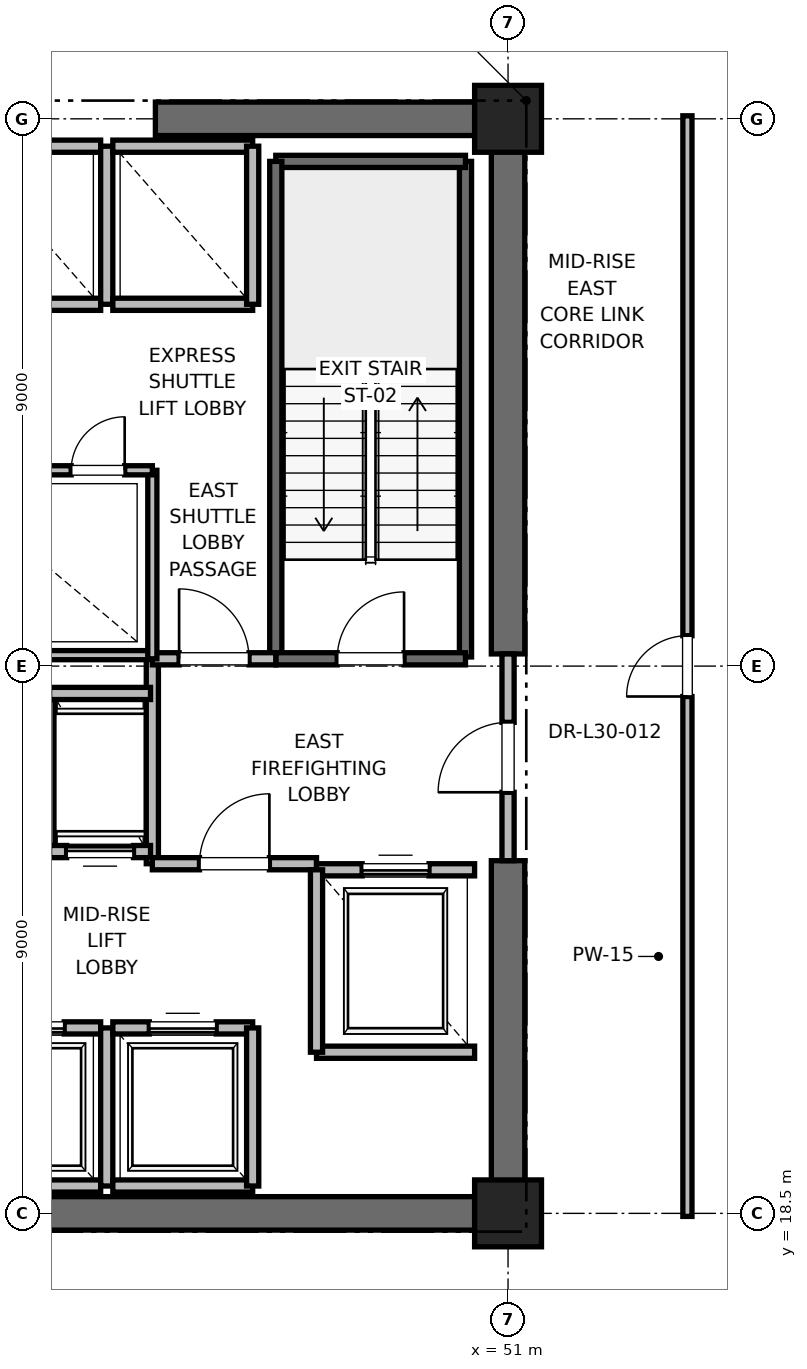
"""IFC4 building model, lengths in metres.
Left out: names, types, materials, properties, quantities, classifications, styles, units other than length and angle.
Written with IfcOpenShell. Run it as: python <this file> out.ifc"""

import sys

from ifc_helpers import new_model, si_unit, direction, frame, frame_2d, origin, origin_2d, place, context, subcontext, project, spatial, rectangle, extrude, element, fill, save


model = new_model("IFC4")
c1 = context("Model", 3, precision=1e-05, world=origin(), true_north=direction((0.0, 1.0)))
c2 = subcontext(c1, "Body", "Model", "MODEL_VIEW")
j1 = project(units=[si_unit("LENGTHUNIT", "METRE"), si_unit("PLANEANGLEUNIT", "RADIAN")], contexts=[c1])
p1 = place(None, origin())
s1 = spatial("IfcSite", under=j1, at=p1, CompositionType="ELEMENT")
p2 = place(p1, origin())
s2 = spatial("IfcBuilding", under=s1, at=p2, CompositionType="ELEMENT")
p3 = place(p2, frame((0.0, 0.0, 132.4)))
s3 = spatial("IfcBuildingStorey", under=s2, at=p3, CompositionType="ELEMENT", Elevation=132.4)
for number, where, z_axis, x_axis in (
    (1, (51.0, 18.5, 0.0), (0.0, 0.0, 1.0), (1.0, 0.0, 0.0)),
    (2, (51.0, 36.5, 0.0), (0.0, 0.0, 1.0), (1.0, 0.0, 0.0)),
):
    element("IfcColumn", number, at=place(p3, frame(where, z_axis=z_axis, x_axis=x_axis)), inside=s3, PredefinedType="PILASTER", context=c2, shape_type="SweptSolid", body=[
        extrude(rectangle(XDim=1.1, YDim=1.1, at=origin_2d()), origin(), (0.0, 0.0, 1.0), 4.0),
    ])
p4 = place(p3, frame((41.8, 18.5, 0.0), z_axis=(0.0, 0.0, 1.0), x_axis=(1.0, 0.0, 0.0)))
e3 = element("IfcWall", 3, at=p4, inside=s3, PredefinedType="SHEAR", context=c2, shape_type="SweptSolid", body=[
    extrude(rectangle(XDim=9.2, YDim=0.55, at=frame_2d((4.6, 0.0))), origin(), (0.0, 0.0, 1.0), 3.775),
])
for number, where, z_axis, x_axis in (
    (4, (45.2, 36.5, 0.0), (0.0, 0.0, 1.0), (1.0, 0.0, 0.0)),
    (5, (51.0, 18.5, 0.0), (0.0, 0.0, 1.0), (0.0, 1.0, 0.0)),
):
    element("IfcWall", number, at=place(p3, frame(where, z_axis=z_axis, x_axis=x_axis)), inside=s3, PredefinedType="SHEAR", context=c2, shape_type="SweptSolid", body=[
        extrude(rectangle(XDim=5.8, YDim=0.55, at=frame_2d((2.9, 0.0))), origin(), (0.0, 0.0, 1.0), 3.775),
    ])
p5 = place(p3, frame((51.0, 27.7, 0.0), z_axis=(0.0, 0.0, 1.0), x_axis=(0.0, 1.0, 0.0)))
e6 = element("IfcWall", 6, at=p5, inside=s3, PredefinedType="SHEAR", context=c2, shape_type="SweptSolid", body=[
    extrude(rectangle(XDim=8.8, YDim=0.55, at=frame_2d((4.4, 0.0))), origin(), (0.0, 0.0, 1.0), 3.775),
])
p6 = place(p3, frame((50.3, 27.65, 0.0), z_axis=(0.0, 0.0, 1.0), x_axis=(0.0, 1.0, 0.0)))
e7 = element("IfcWall", 7, at=p6, inside=s3, PredefinedType="SOLIDWALL", context=c2, shape_type="SweptSolid", body=[
    extrude(rectangle(XDim=8.15, YDim=0.2, at=frame_2d((4.075, 0.0))), origin(), (0.0, 0.0, 1.0), 3.775),
])
p7 = place(p3, frame((47.18, 35.8, 0.0), z_axis=(0.0, 0.0, 1.0), x_axis=(1.0, 0.0, 0.0)))
e8 = element("IfcWall", 8, at=p7, inside=s3, PredefinedType="SOLIDWALL", context=c2, shape_type="SweptSolid", body=[
    extrude(rectangle(XDim=3.12, YDim=0.2, at=frame_2d((1.56, 0.0))), origin(), (0.0, 0.0, 1.0), 3.775),
])
p8 = place(p3, frame((47.18, 27.62, 0.0), z_axis=(0.0, 0.0, 1.0), x_axis=(0.0, 1.0, 0.0)))
e9 = element("IfcWall", 9, at=p8, inside=s3, PredefinedType="SOLIDWALL", context=c2, shape_type="SweptSolid", body=[
    extrude(rectangle(XDim=8.18, YDim=0.2, at=frame_2d((4.09, 0.0))), origin(), (0.0, 0.0, 1.0), 3.775),
])
p9 = place(p3, frame((47.18, 27.62, 0.0), z_axis=(0.0, 0.0, 1.0), x_axis=(1.0, 0.0, 0.0)))
e10 = element("IfcWall", 10, at=p9, inside=s3, PredefinedType="SOLIDWALL", context=c2, shape_type="SweptSolid", body=[
    extrude(rectangle(XDim=3.12, YDim=0.2, at=frame_2d((1.56, 0.0))), origin(), (0.0, 0.0, 1.0), 3.775),
])
p10 = place(p9, frame((1.01, 0.0, 0.0)))
e11 = element("IfcOpeningElement", 11, at=p10, cuts=e10, PredefinedType="OPENING", context=c2, shape_type="SweptSolid", body=[
    extrude(rectangle(XDim=1.1, YDim=2.15, at=frame_2d((0.55, 1.075))), frame((0.0, 0.1, 0.0), z_axis=(0.0, -1.0, 0.0), x_axis=(1.0, 0.0, 0.0)), (0.0, 0.0, 1.0), 0.2),
])
p11 = place(p3, frame((45.15, 24.25, 0.0), z_axis=(0.0, 0.0, 1.0), x_axis=(0.0, 1.0, 0.0)))
e12 = element("IfcWall", 12, at=p11, inside=s3, PredefinedType="PARTITIONING", context=c2, shape_type="SweptSolid", body=[
    extrude(rectangle(XDim=3.37, YDim=0.2, at=frame_2d((1.685, 0.0))), origin(), (0.0, 0.0, 1.0), 3.775),
])
p12 = place(p3, frame((45.15, 24.25, 0.0), z_axis=(0.0, 0.0, 1.0), x_axis=(1.0, 0.0, 0.0)))
e13 = element("IfcWall", 13, at=p12, inside=s3, PredefinedType="PARTITIONING", context=c2, shape_type="SweptSolid", body=[
    extrude(rectangle(XDim=2.7, YDim=0.2, at=frame_2d((1.35, 0.0))), origin(), (0.0, 0.0, 1.0), 3.775),
])
p13 = place(p12, frame((0.775, 0.0, 0.0)))
e14 = element("IfcOpeningElement", 14, at=p13, cuts=e13, PredefinedType="OPENING", context=c2, shape_type="SweptSolid", body=[
    extrude(rectangle(XDim=1.15, YDim=2.2, at=frame_2d((0.575, 1.1))), frame((0.0, 0.1, 0.0), z_axis=(0.0, -1.0, 0.0), x_axis=(1.0, 0.0, 0.0)), (0.0, 0.0, 1.0), 0.2),
])
p14 = place(p3, frame((45.15, 27.62, 0.0), z_axis=(0.0, 0.0, 1.0), x_axis=(1.0, 0.0, 0.0)))
e15 = element("IfcWall", 15, at=p14, inside=s3, PredefinedType="PARTITIONING", context=c2, shape_type="SweptSolid", body=[
    extrude(rectangle(XDim=2.03, YDim=0.2, at=frame_2d((1.015, 0.0))), origin(), (0.0, 0.0, 1.0), 3.775),
])
p15 = place(p14, frame((0.44, 0.0, 0.0)))
e16 = element("IfcOpeningElement", 16, at=p15, cuts=e15, PredefinedType="OPENING", context=c2, shape_type="SweptSolid", body=[
    extrude(rectangle(XDim=1.15, YDim=2.2, at=frame_2d((0.575, 1.1))), frame((0.0, 0.1, 0.0), z_axis=(0.0, -1.0, 0.0), x_axis=(1.0, 0.0, 0.0)), (0.0, 0.0, 1.0), 0.2),
])
p16 = place(p3, frame((51.0, 24.3, 0.0), z_axis=(0.0, 0.0, 1.0), x_axis=(0.0, 1.0, 0.0)))
e17 = element("IfcWall", 17, at=p16, inside=s3, PredefinedType="PARTITIONING", context=c2, shape_type="SweptSolid", body=[
    extrude(rectangle(XDim=3.4, YDim=0.2, at=frame_2d((1.7, 0.0))), origin(), (0.0, 0.0, 1.0), 2.755),
])
p17 = place(p16, frame((1.125, 0.0, 0.0)))
e18 = element("IfcOpeningElement", 18, at=p17, cuts=e17, PredefinedType="OPENING", context=c2, shape_type="SweptSolid", body=[
    extrude(rectangle(XDim=1.15, YDim=2.2, at=frame_2d((0.575, 1.1))), frame((0.0, 0.1, 0.0), z_axis=(0.0, -1.0, 0.0), x_axis=(1.0, 0.0, 0.0)), (0.0, 0.0, 1.0), 0.2),
])
p18 = place(p3, frame((47.85, 21.15, 0.0), z_axis=(0.0, 0.0, 1.0), x_axis=(1.0, 0.0, 0.0)))
e19 = element("IfcWall", 19, at=p18, inside=s3, PredefinedType="SOLIDWALL", context=c2, shape_type="SweptSolid", body=[
    extrude(rectangle(XDim=2.6, YDim=0.2, at=frame_2d((1.3, 0.0))), origin(), (0.0, 0.0, 1.0), 3.775),
])
p19 = place(p3, frame((50.45, 24.15, 0.0), z_axis=(0.0, 0.0, 1.0), x_axis=(-1.0, 0.0, 0.0)))
e20 = element("IfcWall", 20, at=p19, inside=s3, PredefinedType="SOLIDWALL", context=c2, shape_type="SweptSolid", body=[
    extrude(rectangle(XDim=2.6, YDim=0.2, at=frame_2d((1.3, 0.0))), origin(), (0.0, 0.0, 1.0), 2.755),
])
p20 = place(p19, frame((0.75, 0.0, 0.0)))
e21 = element("IfcOpeningElement", 21, at=p20, cuts=e20, PredefinedType="OPENING", context=c2, shape_type="SweptSolid", body=[
    extrude(rectangle(XDim=1.1, YDim=2.2, at=frame_2d((0.55, 1.1))), frame((0.0, 0.1, 0.0), z_axis=(0.0, -1.0, 0.0), x_axis=(1.0, 0.0, 0.0)), (0.0, 0.0, 1.0), 0.2),
])
p21 = place(p3, frame((47.85, 24.15, 0.0), z_axis=(0.0, 0.0, 1.0), x_axis=(0.0, -1.0, 0.0)))
e22 = element("IfcWall", 22, at=p21, inside=s3, PredefinedType="SOLIDWALL", context=c2, shape_type="SweptSolid", body=[
    extrude(rectangle(XDim=3.0, YDim=0.2, at=frame_2d((1.5, 0.0))), origin(), (0.0, 0.0, 1.0), 3.775),
])
p22 = place(p3, frame((42.0, 18.95, 0.0), z_axis=(0.0, 0.0, 1.0), x_axis=(1.0, 0.0, 0.0)))
e23 = element("IfcWall", 23, at=p22, inside=s3, PredefinedType="SOLIDWALL", context=c2, shape_type="SweptSolid", body=[
    extrude(rectangle(XDim=2.3, YDim=0.2, at=frame_2d((1.15, 0.0))), origin(), (0.0, 0.0, 1.0), 2.755),
])
p23 = place(p3, frame((44.3, 21.55, 0.0), z_axis=(0.0, 0.0, 1.0), x_axis=(-1.0, 0.0, 0.0)))
e24 = element("IfcWall", 24, at=p23, inside=s3, PredefinedType="SOLIDWALL", context=c2, shape_type="SweptSolid", body=[
    extrude(rectangle(XDim=2.3, YDim=0.2, at=frame_2d((1.15, 0.0))), origin(), (0.0, 0.0, 1.0), 3.775),
])
p24 = place(p23, frame((0.6, 0.0, 0.0)))
e25 = element("IfcOpeningElement", 25, at=p24, cuts=e24, PredefinedType="OPENING", context=c2, shape_type="SweptSolid", body=[
    extrude(rectangle(XDim=1.1, YDim=2.2, at=frame_2d((0.55, 1.1))), frame((0.0, 0.1, 0.0), z_axis=(0.0, -1.0, 0.0), x_axis=(1.0, 0.0, 0.0)), (0.0, 0.0, 1.0), 0.2),
])
p25 = place(p3, frame((44.4, 18.95, 0.0), z_axis=(0.0, 0.0, 1.0), x_axis=(0.0, 1.0, 0.0)))
e26 = element("IfcWall", 26, at=p25, inside=s3, PredefinedType="SOLIDWALL", context=c2, shape_type="SweptSolid", body=[
    extrude(rectangle(XDim=2.6, YDim=0.2, at=frame_2d((1.3, 0.0))), origin(), (0.0, 0.0, 1.0), 3.775),
])
p26 = place(p3, frame((44.5, 18.95, 0.0), z_axis=(0.0, 0.0, 1.0), x_axis=(1.0, 0.0, 0.0)))
e27 = element("IfcWall", 27, at=p26, inside=s3, PredefinedType="SOLIDWALL", context=c2, shape_type="SweptSolid", body=[
    extrude(rectangle(XDim=2.3, YDim=0.2, at=frame_2d((1.15, 0.0))), origin(), (0.0, 0.0, 1.0), 3.775),
])
p27 = place(p3, frame((46.8, 21.55, 0.0), z_axis=(0.0, 0.0, 1.0), x_axis=(-1.0, 0.0, 0.0)))
e28 = element("IfcWall", 28, at=p27, inside=s3, PredefinedType="SOLIDWALL", context=c2, shape_type="SweptSolid", body=[
    extrude(rectangle(XDim=2.3, YDim=0.2, at=frame_2d((1.15, 0.0))), origin(), (0.0, 0.0, 1.0), 3.775),
])
p28 = place(p27, frame((0.6, 0.0, 0.0)))
e29 = element("IfcOpeningElement", 29, at=p28, cuts=e28, PredefinedType="OPENING", context=c2, shape_type="SweptSolid", body=[
    extrude(rectangle(XDim=1.1, YDim=2.2, at=frame_2d((0.55, 1.1))), frame((0.0, 0.1, 0.0), z_axis=(0.0, -1.0, 0.0), x_axis=(1.0, 0.0, 0.0)), (0.0, 0.0, 1.0), 0.2),
])
for number, where, z_axis, x_axis in (
    (30, (46.8, 18.95, 0.0), (0.0, 0.0, 1.0), (0.0, 1.0, 0.0)),
    (31, (43.45, 24.45, 0.0), (0.0, 0.0, 1.0), (0.0, 1.0, 0.0)),
):
    element("IfcWall", number, at=place(p3, frame(where, z_axis=z_axis, x_axis=x_axis)), inside=s3, PredefinedType="SOLIDWALL", context=c2, shape_type="SweptSolid", body=[
        extrude(rectangle(XDim=2.6, YDim=0.2, at=frame_2d((1.3, 0.0))), origin(), (0.0, 0.0, 1.0), 3.775),
    ])
p29 = place(p3, frame((43.46, 24.45, 0.0), z_axis=(0.0, 0.0, 1.0), x_axis=(1.0, 0.0, 0.0)))
e32 = element("IfcWall", 32, at=p29, inside=s3, PredefinedType="SOLIDWALL", context=c2, shape_type="SweptSolid", body=[
    extrude(rectangle(XDim=1.66, YDim=0.2, at=frame_2d((0.83, 0.0))), origin(), (0.0, 0.0, 1.0), 3.775),
])
p30 = place(p29, frame((0.28, 0.0, 0.0)))
e33 = element("IfcOpeningElement", 33, at=p30, cuts=e32, PredefinedType="OPENING", context=c2, shape_type="SweptSolid", body=[
    extrude(rectangle(XDim=1.1, YDim=2.2, at=frame_2d((0.55, 1.1))), frame((0.0, 0.1, 0.0), z_axis=(0.0, -1.0, 0.0), x_axis=(1.0, 0.0, 0.0)), (0.0, 0.0, 1.0), 0.2),
])
p31 = place(p3, frame((45.12, 27.05, 0.0), z_axis=(0.0, 0.0, 1.0), x_axis=(-1.0, 0.0, 0.0)))
e34 = element("IfcWall", 34, at=p31, inside=s3, PredefinedType="SOLIDWALL", context=c2, shape_type="SweptSolid", body=[
    extrude(rectangle(XDim=1.66, YDim=0.2, at=frame_2d((0.83, 0.0))), origin(), (0.0, 0.0, 1.0), 3.775),
])
p32 = place(p3, frame((42.0, 33.45, 0.0), z_axis=(0.0, 0.0, 1.0), x_axis=(1.0, 0.0, 0.0)))
e35 = element("IfcWall", 35, at=p32, inside=s3, PredefinedType="SOLIDWALL", context=c2, shape_type="SweptSolid", body=[
    extrude(rectangle(XDim=2.3, YDim=0.2, at=frame_2d((1.15, 0.0))), origin(), (0.0, 0.0, 1.0), 3.775),
])
p33 = place(p3, frame((44.3, 36.05, 0.0), z_axis=(0.0, 0.0, 1.0), x_axis=(-1.0, 0.0, 0.0)))
e36 = element("IfcWall", 36, at=p33, inside=s3, PredefinedType="SOLIDWALL", context=c2, shape_type="SweptSolid", body=[
    extrude(rectangle(XDim=2.3, YDim=0.2, at=frame_2d((1.15, 0.0))), origin(), (0.0, 0.0, 1.0), 2.755),
])
p34 = place(p3, frame((44.4, 33.45, 0.0), z_axis=(0.0, 0.0, 1.0), x_axis=(0.0, 1.0, 0.0)))
e37 = element("IfcWall", 37, at=p34, inside=s3, PredefinedType="SOLIDWALL", context=c2, shape_type="SweptSolid", body=[
    extrude(rectangle(XDim=2.6, YDim=0.2, at=frame_2d((1.3, 0.0))), origin(), (0.0, 0.0, 1.0), 2.755),
])
p35 = place(p3, frame((44.5, 33.45, 0.0), z_axis=(0.0, 0.0, 1.0), x_axis=(1.0, 0.0, 0.0)))
e38 = element("IfcWall", 38, at=p35, inside=s3, PredefinedType="SOLIDWALL", context=c2, shape_type="SweptSolid", body=[
    extrude(rectangle(XDim=2.3, YDim=0.2, at=frame_2d((1.15, 0.0))), origin(), (0.0, 0.0, 1.0), 3.775),
])
p36 = place(p3, frame((46.8, 36.05, 0.0), z_axis=(0.0, 0.0, 1.0), x_axis=(-1.0, 0.0, 0.0)))
e39 = element("IfcWall", 39, at=p36, inside=s3, PredefinedType="SOLIDWALL", context=c2, shape_type="SweptSolid", body=[
    extrude(rectangle(XDim=2.3, YDim=0.2, at=frame_2d((1.15, 0.0))), origin(), (0.0, 0.0, 1.0), 2.755),
])
p37 = place(p3, frame((46.8, 33.45, 0.0), z_axis=(0.0, 0.0, 1.0), x_axis=(0.0, 1.0, 0.0)))
e40 = element("IfcWall", 40, at=p37, inside=s3, PredefinedType="SOLIDWALL", context=c2, shape_type="SweptSolid", body=[
    extrude(rectangle(XDim=2.6, YDim=0.2, at=frame_2d((1.3, 0.0))), origin(), (0.0, 0.0, 1.0), 3.775),
])
p38 = place(p3, frame((41.56, 27.68, 0.0), z_axis=(0.0, 0.0, 1.0), x_axis=(1.0, 0.0, 0.0)))
e41 = element("IfcWall", 41, at=p38, inside=s3, PredefinedType="PARTITIONING", context=c2, shape_type="SweptSolid", body=[
    extrude(rectangle(XDim=3.59, YDim=0.15, at=frame_2d((1.795, 0.0))), origin(), (0.0, 0.0, 1.0), 2.85),
])
p39 = place(p3, frame((45.15, 27.62, 0.0), z_axis=(0.0, 0.0, 1.0), x_axis=(0.0, 1.0, 0.0)))
e42 = element("IfcWall", 42, at=p39, inside=s3, PredefinedType="PARTITIONING", context=c2, shape_type="SweptSolid", body=[
    extrude(rectangle(XDim=3.1, YDim=0.15, at=frame_2d((1.55, 0.0))), origin(), (0.0, 0.0, 1.0), 2.85),
])
p40 = place(p3, frame((43.36, 30.72, 0.0), z_axis=(0.0, 0.0, 1.0), x_axis=(1.0, 0.0, 0.0)))
e43 = element("IfcWall", 43, at=p40, inside=s3, PredefinedType="PARTITIONING", context=c2, shape_type="SweptSolid", body=[
    extrude(rectangle(XDim=1.79, YDim=0.15, at=frame_2d((0.895, 0.0))), origin(), (0.0, 0.0, 1.0), 2.85),
])
p41 = place(p40, frame((0.455, 0.0, 0.0)))
e44 = element("IfcOpeningElement", 44, at=p41, cuts=e43, PredefinedType="OPENING", context=c2, shape_type="SweptSolid", body=[
    extrude(rectangle(XDim=0.88, YDim=2.1, at=frame_2d((0.44, 1.05))), frame((0.0, 0.075, 0.0), z_axis=(0.0, -1.0, 0.0), x_axis=(1.0, 0.0, 0.0)), (0.0, 0.0, 1.0), 0.15),
])
p42 = place(p3, frame((53.95, 18.45, 0.0), z_axis=(0.0, 0.0, 1.0), x_axis=(0.0, 1.0, 0.0)))
e45 = element("IfcWall", 45, at=p42, inside=s3, PredefinedType="PARTITIONING", context=c2, shape_type="SweptSolid", body=[
    extrude(rectangle(XDim=18.1, YDim=0.15, at=frame_2d((9.05, 0.0))), origin(), (0.0, 0.0, 1.0), 2.85),
])
p43 = place(p42, frame((8.55, 0.0, 0.0)))
e46 = element("IfcOpeningElement", 46, at=p43, cuts=e45, PredefinedType="OPENING", context=c2, shape_type="SweptSolid", body=[
    extrude(rectangle(XDim=1.0, YDim=2.15, at=frame_2d((0.5, 1.075))), frame((0.0, 0.075, 0.0), z_axis=(0.0, -1.0, 0.0), x_axis=(1.0, 0.0, 0.0)), (0.0, 0.0, 1.0), 0.15),
])
p44 = place(p10, origin())
e47 = element("IfcDoor", 47, at=p44, inside=s3, OperationType="SINGLE_SWING_RIGHT", PredefinedType="DOOR", context=c2, shape_type="SweptSolid", body=[
    extrude(rectangle(XDim=1.1, YDim=2.15, at=frame_2d((0.55, 1.075))), frame((0.0, 0.025, 0.0), z_axis=(0.0, -1.0, 0.0), x_axis=(1.0, 0.0, 0.0)), (0.0, 0.0, 1.0), 0.05),
])
fill(e11, e47)
p45 = place(p13, origin())
e48 = element("IfcDoor", 48, at=p45, inside=s3, OperationType="SINGLE_SWING_RIGHT", PredefinedType="DOOR", context=c2, shape_type="SweptSolid", body=[
    extrude(rectangle(XDim=1.15, YDim=2.2, at=frame_2d((0.575, 1.1))), frame((0.0, 0.025, 0.0), z_axis=(0.0, -1.0, 0.0), x_axis=(1.0, 0.0, 0.0)), (0.0, 0.0, 1.0), 0.05),
])
fill(e14, e48)
p46 = place(p15, origin())
e49 = element("IfcDoor", 49, at=p46, inside=s3, OperationType="SINGLE_SWING_LEFT", PredefinedType="DOOR", context=c2, shape_type="SweptSolid", body=[
    extrude(rectangle(XDim=1.15, YDim=2.2, at=frame_2d((0.575, 1.1))), frame((0.0, 0.025, 0.0), z_axis=(0.0, -1.0, 0.0), x_axis=(1.0, 0.0, 0.0)), (0.0, 0.0, 1.0), 0.05),
])
fill(e16, e49)
p47 = place(p17, origin())
e50 = element("IfcDoor", 50, at=p47, inside=s3, OperationType="SINGLE_SWING_LEFT", PredefinedType="DOOR", context=c2, shape_type="SweptSolid", body=[
    extrude(rectangle(XDim=1.15, YDim=2.2, at=frame_2d((0.575, 1.1))), frame((0.0, 0.025, 0.0), z_axis=(0.0, -1.0, 0.0), x_axis=(1.0, 0.0, 0.0)), (0.0, 0.0, 1.0), 0.05),
])
fill(e18, e50)
p48 = place(p20, origin())
e51 = element("IfcDoor", 51, at=p48, inside=s3, OperationType="SLIDING_TO_RIGHT", PredefinedType="DOOR", context=c2, shape_type="SweptSolid", body=[
    extrude(rectangle(XDim=1.1, YDim=2.2, at=frame_2d((0.55, 1.1))), frame((0.0, 0.025, 0.0), z_axis=(0.0, -1.0, 0.0), x_axis=(1.0, 0.0, 0.0)), (0.0, 0.0, 1.0), 0.05),
])
fill(e21, e51)
p49 = place(p24, origin())
e52 = element("IfcDoor", 52, at=p49, inside=s3, OperationType="SLIDING_TO_RIGHT", PredefinedType="DOOR", context=c2, shape_type="SweptSolid", body=[
    extrude(rectangle(XDim=1.1, YDim=2.2, at=frame_2d((0.55, 1.1))), frame((0.0, 0.025, 0.0), z_axis=(0.0, -1.0, 0.0), x_axis=(1.0, 0.0, 0.0)), (0.0, 0.0, 1.0), 0.05),
])
fill(e25, e52)
p50 = place(p28, origin())
e53 = element("IfcDoor", 53, at=p50, inside=s3, OperationType="SLIDING_TO_RIGHT", PredefinedType="DOOR", context=c2, shape_type="SweptSolid", body=[
    extrude(rectangle(XDim=1.1, YDim=2.2, at=frame_2d((0.55, 1.1))), frame((0.0, 0.025, 0.0), z_axis=(0.0, -1.0, 0.0), x_axis=(1.0, 0.0, 0.0)), (0.0, 0.0, 1.0), 0.05),
])
fill(e29, e53)
p51 = place(p30, origin())
e54 = element("IfcDoor", 54, at=p51, inside=s3, OperationType="SLIDING_TO_RIGHT", PredefinedType="DOOR", context=c2, shape_type="SweptSolid", body=[
    extrude(rectangle(XDim=1.1, YDim=2.2, at=frame_2d((0.55, 1.1))), frame((0.0, 0.025, 0.0), z_axis=(0.0, -1.0, 0.0), x_axis=(1.0, 0.0, 0.0)), (0.0, 0.0, 1.0), 0.05),
])
fill(e33, e54)
p52 = place(p41, origin())
e55 = element("IfcDoor", 55, at=p52, inside=s3, OperationType="SINGLE_SWING_RIGHT", PredefinedType="DOOR", context=c2, shape_type="SweptSolid", body=[
    extrude(rectangle(XDim=0.88, YDim=2.1, at=frame_2d((0.44, 1.05))), frame((0.0, 0.025, 0.0), z_axis=(0.0, -1.0, 0.0), x_axis=(1.0, 0.0, 0.0)), (0.0, 0.0, 1.0), 0.05),
])
fill(e44, e55)
p53 = place(p43, origin())
e56 = element("IfcDoor", 56, at=p53, inside=s3, OperationType="SINGLE_SWING_LEFT", PredefinedType="DOOR", context=c2, shape_type="SweptSolid", body=[
    extrude(rectangle(XDim=1.0, YDim=2.15, at=frame_2d((0.5, 1.075))), frame((0.0, 0.025, 0.0), z_axis=(0.0, -1.0, 0.0), x_axis=(1.0, 0.0, 0.0)), (0.0, 0.0, 1.0), 0.05),
])
fill(e46, e56)
save(model, sys.argv[1])
